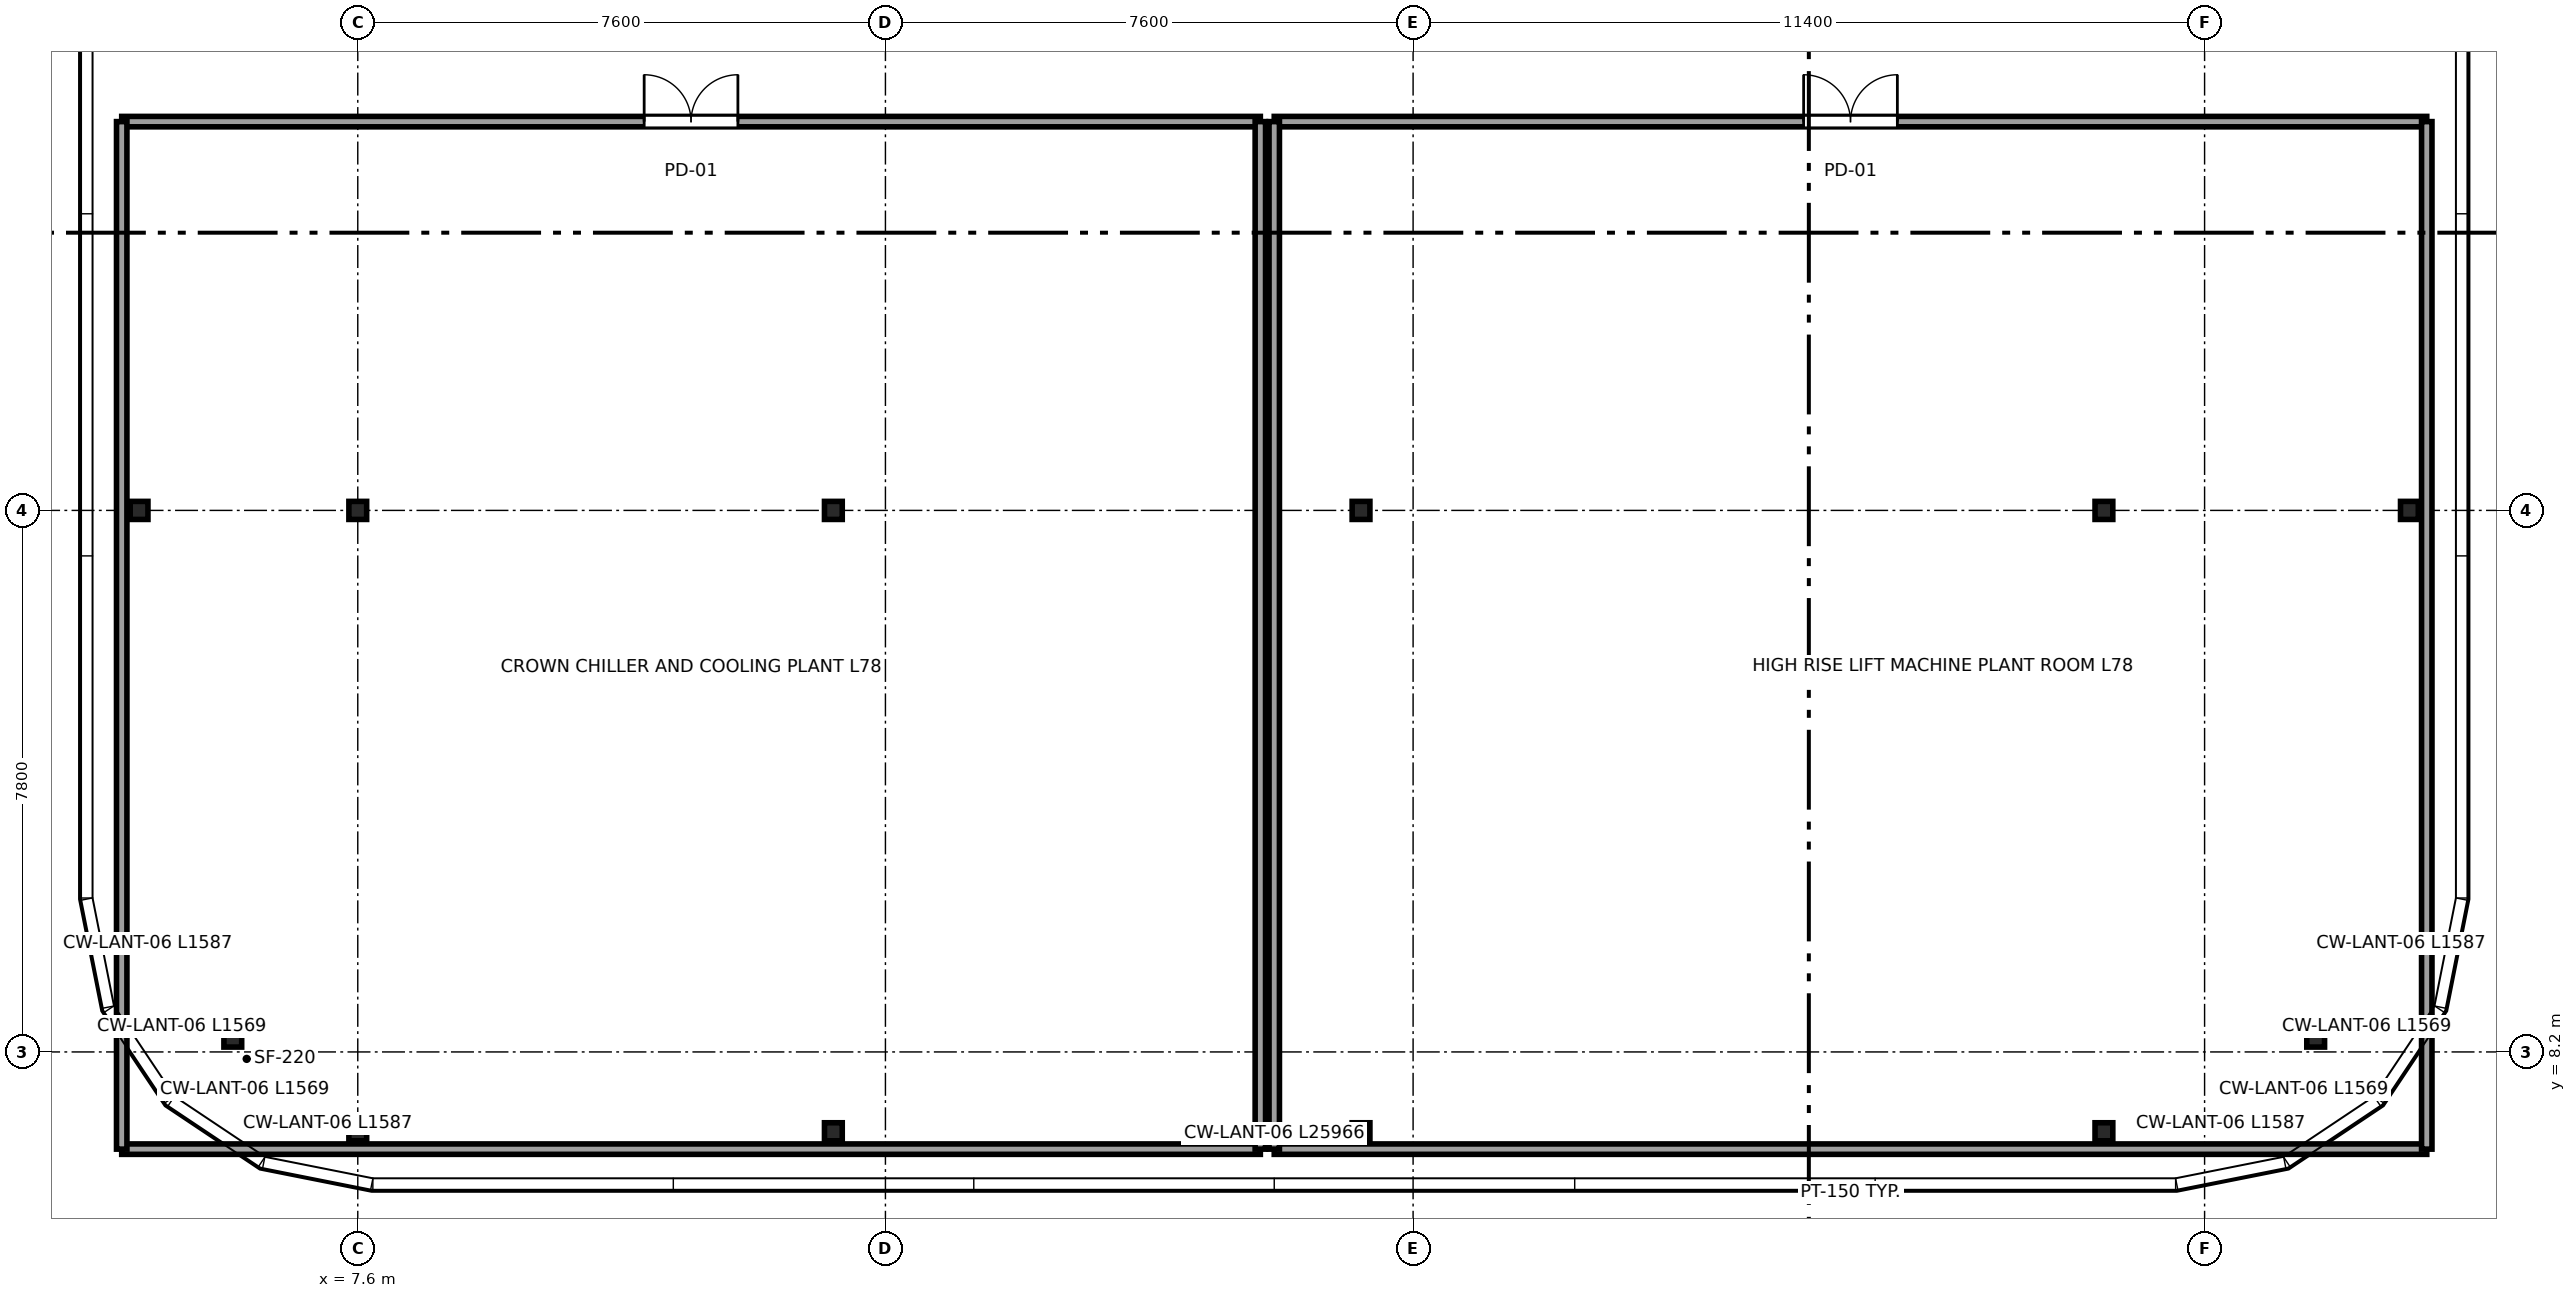
"""IFC4 building model, lengths in metres.
Left out: names, types, materials, properties, quantities, classifications, styles, units other than length and angle.
Written with IfcOpenShell. Run it as: python <this file> out.ifc"""

import sys

from ifc_helpers import new_model, si_unit, direction, frame, frame_2d, origin, origin_2d, place, context, subcontext, project, spatial, rectangle, i_section, extrude, source, transform, mapped, element, fill, save


model = new_model("IFC4")
c1 = context("Model", 3, precision=1e-05, world=origin(), true_north=direction((0.0, 1.0)))
c2 = subcontext(c1, "Body", "Model", "MODEL_VIEW")
j1 = project(units=[si_unit("LENGTHUNIT", "METRE"), si_unit("PLANEANGLEUNIT", "RADIAN")], contexts=[c1])
p1 = place(None, origin())
s1 = spatial("IfcSite", under=j1, at=p1, CompositionType="ELEMENT")
p2 = place(p1, origin())
s2 = spatial("IfcBuilding", under=s1, at=p2, CompositionType="ELEMENT")
p3 = place(p2, frame((0.0, 0.0, 294.75)))
s3 = spatial("IfcBuildingStorey", under=s2, at=p3, CompositionType="ELEMENT", Elevation=294.75)
m1 = source(origin(), c2, "Body", "SweptSolid", [
    extrude(i_section(OverallWidth=0.256, OverallDepth=0.26, WebThickness=0.01, FlangeThickness=0.017, FilletRadius=0.014, at=origin_2d()), origin(), (0.0, 0.0, 1.0), 3.8),
])
for number, where, z_axis, x_axis in (
    (1, (5.8, 8.4, 0.0), (0.0, 0.0, 1.0), (1.0, 0.0, 0.0)),
    (2, (4.45, 16.0, 0.0), (0.0, 0.0, 1.0), (1.0, 0.0, 0.0)),
    (3, (7.6, 7.05, 0.0), (0.0, 0.0, 1.0), (1.0, 0.0, 0.0)),
    (4, (7.6, 16.0, 0.0), (0.0, 0.0, 1.0), (1.0, 0.0, 0.0)),
    (5, (14.45, 7.05, 0.0), (0.0, 0.0, 1.0), (1.0, 0.0, 0.0)),
    (6, (14.45, 16.0, 0.0), (0.0, 0.0, 1.0), (1.0, 0.0, 0.0)),
    (7, (22.05, 7.05, 0.0), (0.0, 0.0, 1.0), (1.0, 0.0, 0.0)),
    (8, (22.05, 16.0, 0.0), (0.0, 0.0, 1.0), (1.0, 0.0, 0.0)),
    (9, (32.75, 7.05, 0.0), (0.0, 0.0, 1.0), (1.0, 0.0, 0.0)),
    (10, (32.75, 16.0, 0.0), (0.0, 0.0, 1.0), (1.0, 0.0, 0.0)),
    (11, (35.8, 8.4, 0.0), (0.0, 0.0, 1.0), (1.0, 0.0, 0.0)),
    (12, (37.15, 16.0, 0.0), (0.0, 0.0, 1.0), (1.0, 0.0, 0.0)),
):
    element("IfcColumn", number, at=place(p3, frame(where, z_axis=z_axis, x_axis=x_axis)), inside=s3, PredefinedType="COLUMN", context=c2, shape_type="MappedRepresentation", body=[
        mapped(m1, transform((0.0, 0.0, 0.0), x_axis=(1.0, 0.0, 0.0), y_axis=(0.0, 1.0, 0.0), z_axis=(0.0, 0.0, 1.0), scale=1.0)),
    ])
p4 = place(p3, frame((4.2, 6.8, 0.0), z_axis=(0.0, 0.0, 1.0), x_axis=(1.0, 0.0, 0.0)))
e13 = element("IfcWall", 13, at=p4, inside=s3, PredefinedType="PARTITIONING", context=c2, shape_type="SweptSolid", body=[
    extrude(rectangle(XDim=16.4, YDim=0.15, at=frame_2d((8.2, 0.0))), origin(), (0.0, 0.0, 1.0), 3.58),
])
p5 = place(p3, frame((4.2, 21.6, 0.0), z_axis=(0.0, 0.0, 1.0), x_axis=(1.0, 0.0, 0.0)))
e14 = element("IfcWall", 14, at=p5, inside=s3, PredefinedType="PARTITIONING", context=c2, shape_type="SweptSolid", body=[
    extrude(rectangle(XDim=16.4, YDim=0.15, at=frame_2d((8.2, 0.0))), origin(), (0.0, 0.0, 1.0), 3.58),
])
p6 = place(p5, frame((7.525, 0.0, 0.0)))
e15 = element("IfcOpeningElement", 15, at=p6, cuts=e14, PredefinedType="OPENING", context=c2, shape_type="SweptSolid", body=[
    extrude(rectangle(XDim=1.35, YDim=2.15, at=frame_2d((0.675, 1.075))), frame((0.0, 0.085, 0.0), z_axis=(0.0, -1.0, 0.0), x_axis=(1.0, 0.0, 0.0)), (0.0, 0.0, 1.0), 0.17),
])
for number, where, z_axis, x_axis in (
    (16, (4.2, 6.8, 0.0), (0.0, 0.0, 1.0), (0.0, 1.0, 0.0)),
    (17, (20.6, 6.8, 0.0), (0.0, 0.0, 1.0), (0.0, 1.0, 0.0)),
):
    element("IfcWall", number, at=place(p3, frame(where, z_axis=z_axis, x_axis=x_axis)), inside=s3, PredefinedType="PARTITIONING", context=c2, shape_type="SweptSolid", body=[
        extrude(rectangle(XDim=14.8, YDim=0.15, at=frame_2d((7.4, 0.0))), origin(), (0.0, 0.0, 1.0), 3.58),
    ])
p7 = place(p3, frame((20.8, 6.8, 0.0), z_axis=(0.0, 0.0, 1.0), x_axis=(1.0, 0.0, 0.0)))
e18 = element("IfcWall", 18, at=p7, inside=s3, PredefinedType="PARTITIONING", context=c2, shape_type="SweptSolid", body=[
    extrude(rectangle(XDim=16.6, YDim=0.15, at=frame_2d((8.3, 0.0))), origin(), (0.0, 0.0, 1.0), 3.58),
])
p8 = place(p3, frame((20.8, 21.6, 0.0), z_axis=(0.0, 0.0, 1.0), x_axis=(1.0, 0.0, 0.0)))
e19 = element("IfcWall", 19, at=p8, inside=s3, PredefinedType="PARTITIONING", context=c2, shape_type="SweptSolid", body=[
    extrude(rectangle(XDim=16.6, YDim=0.15, at=frame_2d((8.3, 0.0))), origin(), (0.0, 0.0, 1.0), 3.58),
])
p9 = place(p8, frame((7.625, 0.0, 0.0)))
e20 = element("IfcOpeningElement", 20, at=p9, cuts=e19, PredefinedType="OPENING", context=c2, shape_type="SweptSolid", body=[
    extrude(rectangle(XDim=1.35, YDim=2.15, at=frame_2d((0.675, 1.075))), frame((0.0, 0.085, 0.0), z_axis=(0.0, -1.0, 0.0), x_axis=(1.0, 0.0, 0.0)), (0.0, 0.0, 1.0), 0.17),
])
for number, where, z_axis, x_axis in (
    (21, (20.8, 6.8, 0.0), (0.0, 0.0, 1.0), (0.0, 1.0, 0.0)),
    (22, (37.4, 6.8, 0.0), (0.0, 0.0, 1.0), (0.0, 1.0, 0.0)),
):
    element("IfcWall", number, at=place(p3, frame(where, z_axis=z_axis, x_axis=x_axis)), inside=s3, PredefinedType="PARTITIONING", context=c2, shape_type="SweptSolid", body=[
        extrude(rectangle(XDim=14.8, YDim=0.15, at=frame_2d((7.4, 0.0))), origin(), (0.0, 0.0, 1.0), 3.58),
    ])
m2 = source(origin(), c2, "Body", "SweptSolid", [
    extrude(rectangle(XDim=1.35, YDim=2.15, at=frame_2d((0.675, 1.075))), frame((0.0, 0.025, 0.0), z_axis=(0.0, -1.0, 0.0), x_axis=(1.0, 0.0, 0.0)), (0.0, 0.0, 1.0), 0.05),
])
p10 = place(p6, origin())
e23 = element("IfcDoor", 23, at=p10, inside=s3, OperationType="DOUBLE_DOOR_SINGLE_SWING", PredefinedType="DOOR", context=c2, shape_type="MappedRepresentation", body=[
    mapped(m2, transform((0.0, 0.0, 0.0), x_axis=(1.0, 0.0, 0.0), y_axis=(0.0, 1.0, 0.0), z_axis=(0.0, 0.0, 1.0), scale=1.0)),
])
fill(e15, e23)
p11 = place(p9, origin())
e24 = element("IfcDoor", 24, at=p11, inside=s3, OperationType="DOUBLE_DOOR_SINGLE_SWING", PredefinedType="DOOR", context=c2, shape_type="MappedRepresentation", body=[
    mapped(m2, transform((0.0, 0.0, 0.0), x_axis=(1.0, 0.0, 0.0), y_axis=(0.0, 1.0, 0.0), z_axis=(0.0, 0.0, 1.0), scale=1.0)),
])
fill(e20, e24)
save(model, sys.argv[1])
